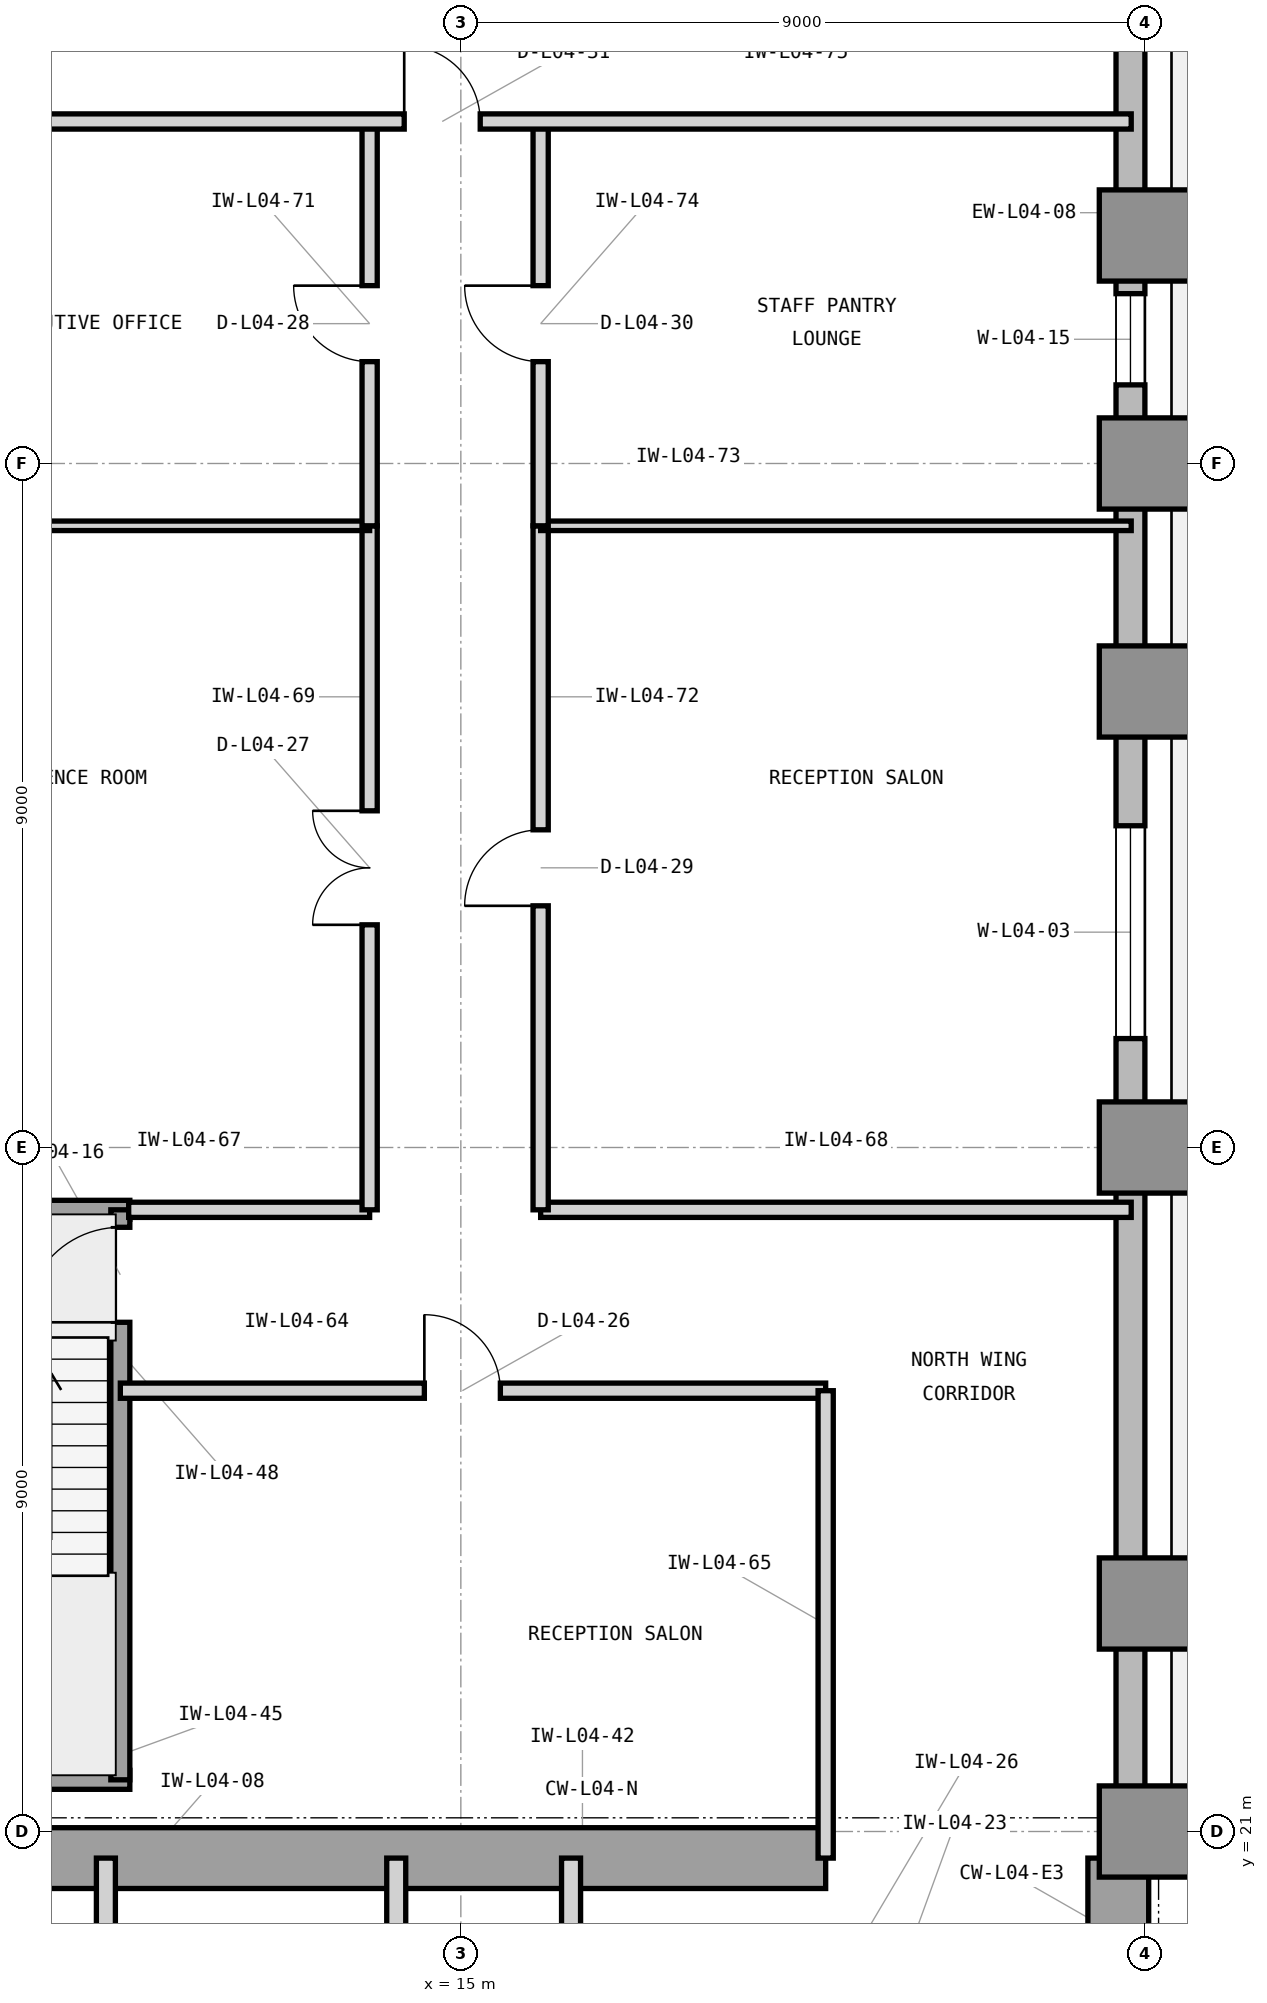
"""IFC4 building model, lengths in metres.
Left out: names, types, materials, properties, quantities, classifications, styles, units other than length and angle.
Written with IfcOpenShell. Run it as: python <this file> out.ifc"""

import sys

from ifc_helpers import new_model, si_unit, direction, frame, frame_2d, origin, origin_2d, place, context, subcontext, project, spatial, rectangle, extrude, element, fill, save


model = new_model("IFC4")
c1 = context("Model", 3, precision=1e-05, world=origin(), true_north=direction((0.0, 1.0)))
c2 = subcontext(c1, "Body", "Model", "MODEL_VIEW")
j1 = project(units=[si_unit("LENGTHUNIT", "METRE"), si_unit("PLANEANGLEUNIT", "RADIAN")], contexts=[c1])
p1 = place(None, origin())
s1 = spatial("IfcSite", under=j1, at=p1, CompositionType="ELEMENT")
p2 = place(p1, origin())
s2 = spatial("IfcBuilding", under=s1, at=p2, CompositionType="ELEMENT")
p3 = place(p2, frame((0.0, 0.0, 21.6)))
s3 = spatial("IfcBuildingStorey", under=s2, at=p3, CompositionType="ELEMENT", Elevation=21.6)
p4 = place(p3, frame((7.475, 20.65, 0.0), z_axis=(0.0, 0.0, 1.0), x_axis=(1.0, 0.0, 0.0)))
e1 = element("IfcWall", 1, at=p4, inside=s3, PredefinedType="SHEAR", context=c2, shape_type="SweptSolid", body=[
    extrude(rectangle(XDim=12.325, YDim=0.8, at=frame_2d((6.163, 0.0))), origin(), (0.0, 0.0, 1.0), 4.2),
])
p5 = place(p3, frame((23.65, 16.6, 0.0), z_axis=(0.0, 0.0, 1.0), x_axis=(0.0, 1.0, 0.0)))
e2 = element("IfcWall", 2, at=p5, inside=s3, PredefinedType="SHEAR", context=c2, shape_type="SweptSolid", body=[
    extrude(rectangle(XDim=4.05, YDim=0.8, at=frame_2d((2.025, 0.0))), origin(), (0.0, 0.0, 1.0), 4.2),
])
for number, where, z_axis, x_axis in (
    (3, (24.0, 21.0, 0.0), (0.0, 0.0, 1.0), (1.0, 0.0, 0.0)),
    (4, (24.0, 24.0, 0.0), (0.0, 0.0, 1.0), (1.0, 0.0, 0.0)),
    (5, (24.0, 30.0, 0.0), (0.0, 0.0, 1.0), (1.0, 0.0, 0.0)),
    (6, (24.0, 36.0, 0.0), (0.0, 0.0, 1.0), (1.0, 0.0, 0.0)),
    (7, (24.0, 39.0, 0.0), (0.0, 0.0, 1.0), (1.0, 0.0, 0.0)),
    (8, (24.0, 42.0, 0.0), (0.0, 0.0, 1.0), (1.0, 0.0, 0.0)),
):
    element("IfcColumn", number, at=place(p3, frame(where, z_axis=z_axis, x_axis=x_axis)), inside=s3, PredefinedType="COLUMN", context=c2, shape_type="SweptSolid", body=[
        extrude(rectangle(XDim=1.2, YDim=1.2, at=origin_2d()), origin(), (0.0, 0.0, 1.0), 4.2),
    ])
p6 = place(p3, frame((64.4, 20.81, 0.0), z_axis=(0.0, 0.0, 1.0), x_axis=(-1.0, 0.0, 0.0)))
e9 = element("IfcWall", 9, at=p6, inside=s3, PredefinedType="STANDARD", context=c2, shape_type="SweptSolid", body=[
    extrude(rectangle(XDim=40.4, YDim=0.38, at=frame_2d((20.2, 0.0))), origin(), (0.0, 0.0, 1.0), 3.98),
])
p7 = place(p6, frame((23.6, 0.0, 0.0)))
e10 = element("IfcOpeningElement", 10, at=p7, cuts=e9, PredefinedType="OPENING", context=c2, shape_type="SweptSolid", body=[
    extrude(rectangle(XDim=1.8, YDim=2.35, at=frame_2d((0.9, 1.175))), frame((0.0, 0.2, 0.0), z_axis=(0.0, -1.0, 0.0), x_axis=(1.0, 0.0, 0.0)), (0.0, 0.0, 1.0), 0.4),
])
p8 = place(p6, frame((38.234, 0.0, 0.85)))
e11 = element("IfcOpeningElement", 11, at=p8, cuts=e9, PredefinedType="OPENING", context=c2, shape_type="SweptSolid", body=[
    extrude(rectangle(XDim=1.2, YDim=2.45, at=frame_2d((0.6, 1.225))), frame((0.0, 0.2, 0.0), z_axis=(0.0, -1.0, 0.0), x_axis=(1.0, 0.0, 0.0)), (0.0, 0.0, 1.0), 0.4),
])
p9 = place(p6, frame((32.354, 0.0, 0.85)))
e12 = element("IfcOpeningElement", 12, at=p9, cuts=e9, PredefinedType="OPENING", context=c2, shape_type="SweptSolid", body=[
    extrude(rectangle(XDim=2.8, YDim=2.45, at=frame_2d((1.4, 1.225))), frame((0.0, 0.2, 0.0), z_axis=(0.0, -1.0, 0.0), x_axis=(1.0, 0.0, 0.0)), (0.0, 0.0, 1.0), 0.4),
])
p10 = place(p6, frame((18.604, 0.0, 0.85)))
e13 = element("IfcOpeningElement", 13, at=p10, cuts=e9, PredefinedType="OPENING", context=c2, shape_type="SweptSolid", body=[
    extrude(rectangle(XDim=2.8, YDim=2.45, at=frame_2d((1.4, 1.225))), frame((0.0, 0.2, 0.0), z_axis=(0.0, -1.0, 0.0), x_axis=(1.0, 0.0, 0.0)), (0.0, 0.0, 1.0), 0.4),
])
p11 = place(p6, frame((11.154, 0.0, 0.85)))
e14 = element("IfcOpeningElement", 14, at=p11, cuts=e9, PredefinedType="OPENING", context=c2, shape_type="SweptSolid", body=[
    extrude(rectangle(XDim=1.2, YDim=2.45, at=frame_2d((0.6, 1.225))), frame((0.0, 0.2, 0.0), z_axis=(0.0, -1.0, 0.0), x_axis=(1.0, 0.0, 0.0)), (0.0, 0.0, 1.0), 0.4),
])
p12 = place(p3, frame((23.81, 21.0, 0.0), z_axis=(0.0, 0.0, 1.0), x_axis=(0.0, 1.0, 0.0)))
e15 = element("IfcWall", 15, at=p12, inside=s3, PredefinedType="STANDARD", context=c2, shape_type="SweptSolid", body=[
    extrude(rectangle(XDim=28.4, YDim=0.38, at=frame_2d((14.2, 0.0))), origin(), (0.0, 0.0, 1.0), 3.98),
])
p13 = place(p12, frame((10.433, 0.0, 0.85)))
e16 = element("IfcOpeningElement", 16, at=p13, cuts=e15, PredefinedType="OPENING", context=c2, shape_type="SweptSolid", body=[
    extrude(rectangle(XDim=2.8, YDim=2.45, at=frame_2d((1.4, 1.225))), frame((0.0, 0.2, 0.0), z_axis=(0.0, -1.0, 0.0), x_axis=(1.0, 0.0, 0.0)), (0.0, 0.0, 1.0), 0.4),
])
p14 = place(p12, frame((19.034, 0.0, 0.85)))
e17 = element("IfcOpeningElement", 17, at=p14, cuts=e15, PredefinedType="OPENING", context=c2, shape_type="SweptSolid", body=[
    extrude(rectangle(XDim=1.2, YDim=2.45, at=frame_2d((0.6, 1.225))), frame((0.0, 0.2, 0.0), z_axis=(0.0, -1.0, 0.0), x_axis=(1.0, 0.0, 0.0)), (0.0, 0.0, 1.0), 0.4),
])
p15 = place(p3, frame((10.33, 19.45, 0.0), z_axis=(0.0, 0.0, 1.0), x_axis=(0.0, 1.0, 0.0)))
e18 = element("IfcWall", 18, at=p15, inside=s3, PredefinedType="PARTITIONING", context=c2, shape_type="SweptSolid", body=[
    extrude(rectangle(XDim=1.2, YDim=0.25, at=frame_2d((0.6, 0.0))), origin(), (0.0, 0.0, 1.0), 3.114),
])
for number, where, z_axis, x_axis in (
    (19, (14.15, 16.7, 0.0), (0.0, 0.0, 1.0), (0.0, 1.0, 0.0)),
    (20, (16.45, 16.7, 0.0), (0.0, 0.0, 1.0), (0.0, 1.0, 0.0)),
):
    element("IfcWall", number, at=place(p3, frame(where, z_axis=z_axis, x_axis=x_axis)), inside=s3, PredefinedType="PARTITIONING", context=c2, shape_type="SweptSolid", body=[
        extrude(rectangle(XDim=3.95, YDim=0.25, at=frame_2d((1.975, 0.0))), origin(), (0.0, 0.0, 1.0), 3.97),
    ])
for number, where, z_axis, x_axis in (
    (21, (6.555, 21.68, 0.0), (0.0, 0.0, 1.0), (1.0, 0.0, 0.0)),
    (22, (6.555, 29.18, 0.0), (0.0, 0.0, 1.0), (1.0, 0.0, 0.0)),
):
    element("IfcWall", number, at=place(p3, frame(where, z_axis=z_axis, x_axis=x_axis)), inside=s3, PredefinedType="SHEAR", context=c2, shape_type="SweptSolid", body=[
        extrude(rectangle(XDim=4.09, YDim=0.25, at=frame_2d((2.045, 0.0))), origin(), (0.0, 0.0, 1.0), 4.2),
    ])
p16 = place(p3, frame((10.52, 21.68, 0.0), z_axis=(0.0, 0.0, 1.0), x_axis=(0.0, 1.0, 0.0)))
e23 = element("IfcWall", 23, at=p16, inside=s3, PredefinedType="SHEAR", context=c2, shape_type="SweptSolid", body=[
    extrude(rectangle(XDim=7.5, YDim=0.25, at=frame_2d((3.75, 0.0))), origin(), (0.0, 0.0, 1.0), 4.2),
])
p17 = place(p16, frame((6.02, 0.0, 0.0)))
e24 = element("IfcOpeningElement", 24, at=p17, cuts=e23, PredefinedType="OPENING", context=c2, shape_type="SweptSolid", body=[
    extrude(rectangle(XDim=1.25, YDim=2.2, at=frame_2d((0.625, 1.1))), frame((0.0, 0.135, 0.0), z_axis=(0.0, -1.0, 0.0), x_axis=(1.0, 0.0, 0.0)), (0.0, 0.0, 1.0), 0.27),
])
p18 = place(p3, frame((10.52, 26.8, 0.0), z_axis=(0.0, 0.0, 1.0), x_axis=(1.0, 0.0, 0.0)))
e25 = element("IfcWall", 25, at=p18, inside=s3, PredefinedType="PARTITIONING", context=c2, shape_type="SweptSolid", body=[
    extrude(rectangle(XDim=9.28, YDim=0.2, at=frame_2d((4.64, 0.0))), origin(), (0.0, 0.0, 1.0), 3.97),
])
p19 = place(p18, frame((4.0, 0.0, 0.0)))
e26 = element("IfcOpeningElement", 26, at=p19, cuts=e25, PredefinedType="OPENING", context=c2, shape_type="SweptSolid", body=[
    extrude(rectangle(XDim=1.0, YDim=2.15, at=frame_2d((0.5, 1.075))), frame((0.0, 0.11, 0.0), z_axis=(0.0, -1.0, 0.0), x_axis=(1.0, 0.0, 0.0)), (0.0, 0.0, 1.0), 0.22),
])
p20 = place(p3, frame((19.8, 20.65, 0.0), z_axis=(0.0, 0.0, 1.0), x_axis=(0.0, 1.0, 0.0)))
e27 = element("IfcWall", 27, at=p20, inside=s3, PredefinedType="PARTITIONING", context=c2, shape_type="SweptSolid", body=[
    extrude(rectangle(XDim=6.15, YDim=0.2, at=frame_2d((3.075, 0.0))), origin(), (0.0, 0.0, 1.0), 3.97),
])
p21 = place(p3, frame((10.63, 29.18, 0.0), z_axis=(0.0, 0.0, 1.0), x_axis=(1.0, 0.0, 0.0)))
e28 = element("IfcWall", 28, at=p21, inside=s3, PredefinedType="PARTITIONING", context=c2, shape_type="SweptSolid", body=[
    extrude(rectangle(XDim=3.17, YDim=0.2, at=frame_2d((1.585, 0.0))), origin(), (0.0, 0.0, 1.0), 3.97),
])
p22 = place(p3, frame((16.05, 29.18, 0.0), z_axis=(0.0, 0.0, 1.0), x_axis=(1.0, 0.0, 0.0)))
e29 = element("IfcWall", 29, at=p22, inside=s3, PredefinedType="PARTITIONING", context=c2, shape_type="SweptSolid", body=[
    extrude(rectangle(XDim=7.77, YDim=0.2, at=frame_2d((3.885, 0.0))), origin(), (0.0, 0.0, 1.0), 3.97),
])
p23 = place(p3, frame((13.8, 29.18, 0.0), z_axis=(0.0, 0.0, 1.0), x_axis=(0.0, 1.0, 0.0)))
e30 = element("IfcWall", 30, at=p23, inside=s3, PredefinedType="PARTITIONING", context=c2, shape_type="SweptSolid", body=[
    extrude(rectangle(XDim=9.0, YDim=0.2, at=frame_2d((4.5, 0.0))), origin(), (0.0, 0.0, 1.0), 3.97),
])
p24 = place(p23, frame((3.75, 0.0, 0.0)))
e31 = element("IfcOpeningElement", 31, at=p24, cuts=e30, PredefinedType="OPENING", context=c2, shape_type="SweptSolid", body=[
    extrude(rectangle(XDim=1.5, YDim=2.3, at=frame_2d((0.75, 1.15))), frame((0.0, 0.11, 0.0), z_axis=(0.0, -1.0, 0.0), x_axis=(1.0, 0.0, 0.0)), (0.0, 0.0, 1.0), 0.22),
])
p25 = place(p3, frame((6.18, 38.18, 0.0), z_axis=(0.0, 0.0, 1.0), x_axis=(1.0, 0.0, 0.0)))
e32 = element("IfcWall", 32, at=p25, inside=s3, PredefinedType="PARTITIONING", context=c2, shape_type="SweptSolid", body=[
    extrude(rectangle(XDim=7.62, YDim=0.125, at=frame_2d((3.81, 0.0))), origin(), (0.0, 0.0, 1.0), 3.97),
])
p26 = place(p3, frame((13.8, 38.18, 0.0), z_axis=(0.0, 0.0, 1.0), x_axis=(0.0, 1.0, 0.0)))
e33 = element("IfcWall", 33, at=p26, inside=s3, PredefinedType="PARTITIONING", context=c2, shape_type="SweptSolid", body=[
    extrude(rectangle(XDim=5.32, YDim=0.2, at=frame_2d((2.66, 0.0))), origin(), (0.0, 0.0, 1.0), 3.97),
])
p27 = place(p26, frame((2.16, 0.0, 0.0)))
e34 = element("IfcOpeningElement", 34, at=p27, cuts=e33, PredefinedType="OPENING", context=c2, shape_type="SweptSolid", body=[
    extrude(rectangle(XDim=1.0, YDim=2.15, at=frame_2d((0.5, 1.075))), frame((0.0, 0.11, 0.0), z_axis=(0.0, -1.0, 0.0), x_axis=(1.0, 0.0, 0.0)), (0.0, 0.0, 1.0), 0.22),
])
p28 = place(p3, frame((16.05, 29.18, 0.0), z_axis=(0.0, 0.0, 1.0), x_axis=(0.0, 1.0, 0.0)))
e35 = element("IfcWall", 35, at=p28, inside=s3, PredefinedType="PARTITIONING", context=c2, shape_type="SweptSolid", body=[
    extrude(rectangle(XDim=9.0, YDim=0.2, at=frame_2d((4.5, 0.0))), origin(), (0.0, 0.0, 1.0), 3.97),
])
p29 = place(p28, frame((4.0, 0.0, 0.0)))
e36 = element("IfcOpeningElement", 36, at=p29, cuts=e35, PredefinedType="OPENING", context=c2, shape_type="SweptSolid", body=[
    extrude(rectangle(XDim=1.0, YDim=2.15, at=frame_2d((0.5, 1.075))), frame((0.0, 0.11, 0.0), z_axis=(0.0, -1.0, 0.0), x_axis=(1.0, 0.0, 0.0)), (0.0, 0.0, 1.0), 0.22),
])
p30 = place(p3, frame((16.05, 38.18, 0.0), z_axis=(0.0, 0.0, 1.0), x_axis=(1.0, 0.0, 0.0)))
e37 = element("IfcWall", 37, at=p30, inside=s3, PredefinedType="PARTITIONING", context=c2, shape_type="SweptSolid", body=[
    extrude(rectangle(XDim=7.77, YDim=0.125, at=frame_2d((3.885, 0.0))), origin(), (0.0, 0.0, 1.0), 3.97),
])
p31 = place(p3, frame((16.05, 38.18, 0.0), z_axis=(0.0, 0.0, 1.0), x_axis=(0.0, 1.0, 0.0)))
e38 = element("IfcWall", 38, at=p31, inside=s3, PredefinedType="PARTITIONING", context=c2, shape_type="SweptSolid", body=[
    extrude(rectangle(XDim=5.32, YDim=0.2, at=frame_2d((2.66, 0.0))), origin(), (0.0, 0.0, 1.0), 3.97),
])
p32 = place(p31, frame((2.16, 0.0, 0.0)))
e39 = element("IfcOpeningElement", 39, at=p32, cuts=e38, PredefinedType="OPENING", context=c2, shape_type="SweptSolid", body=[
    extrude(rectangle(XDim=1.0, YDim=2.15, at=frame_2d((0.5, 1.075))), frame((0.0, 0.11, 0.0), z_axis=(0.0, -1.0, 0.0), x_axis=(1.0, 0.0, 0.0)), (0.0, 0.0, 1.0), 0.22),
])
p33 = place(p3, frame((6.18, 43.5, 0.0), z_axis=(0.0, 0.0, 1.0), x_axis=(1.0, 0.0, 0.0)))
e40 = element("IfcWall", 40, at=p33, inside=s3, PredefinedType="PARTITIONING", context=c2, shape_type="SweptSolid", body=[
    extrude(rectangle(XDim=17.64, YDim=0.2, at=frame_2d((8.82, 0.0))), origin(), (0.0, 0.0, 1.0), 3.97),
])
p34 = place(p33, frame((8.075, 0.0, 0.0)))
e41 = element("IfcOpeningElement", 41, at=p34, cuts=e40, PredefinedType="OPENING", context=c2, shape_type="SweptSolid", body=[
    extrude(rectangle(XDim=1.0, YDim=2.15, at=frame_2d((0.5, 1.075))), frame((0.0, 0.11, 0.0), z_axis=(0.0, -1.0, 0.0), x_axis=(1.0, 0.0, 0.0)), (0.0, 0.0, 1.0), 0.22),
])
p35 = place(p13, origin())
e42 = element("IfcWindow", 42, at=p35, inside=s3, PartitioningType="SINGLE_PANEL", PredefinedType="WINDOW", context=c2, shape_type="SweptSolid", body=[
    extrude(rectangle(XDim=2.8, YDim=2.45, at=frame_2d((1.4, 1.225))), frame((0.0, 0.11, 0.0), z_axis=(0.0, -1.0, 0.0), x_axis=(1.0, 0.0, 0.0)), (0.0, 0.0, 1.0), 0.06),
])
fill(e16, e42)
p36 = place(p17, origin())
e43 = element("IfcDoor", 43, at=p36, inside=s3, OperationType="SINGLE_SWING_LEFT", PredefinedType="DOOR", context=c2, shape_type="SweptSolid", body=[
    extrude(rectangle(XDim=1.25, YDim=2.2, at=frame_2d((0.625, 1.1))), frame((0.0, 0.025, 0.0), z_axis=(0.0, -1.0, 0.0), x_axis=(1.0, 0.0, 0.0)), (0.0, 0.0, 1.0), 0.05),
])
fill(e24, e43)
p37 = place(p19, origin())
e44 = element("IfcDoor", 44, at=p37, inside=s3, OperationType="SINGLE_SWING_LEFT", PredefinedType="DOOR", context=c2, shape_type="SweptSolid", body=[
    extrude(rectangle(XDim=1.0, YDim=2.15, at=frame_2d((0.5, 1.075))), frame((0.0, 0.025, 0.0), z_axis=(0.0, -1.0, 0.0), x_axis=(1.0, 0.0, 0.0)), (0.0, 0.0, 1.0), 0.05),
])
fill(e26, e44)
p38 = place(p24, origin())
e45 = element("IfcDoor", 45, at=p38, inside=s3, OperationType="DOUBLE_DOOR_SINGLE_SWING", PredefinedType="DOOR", context=c2, shape_type="SweptSolid", body=[
    extrude(rectangle(XDim=1.5, YDim=2.3, at=frame_2d((0.75, 1.15))), frame((0.0, 0.025, 0.0), z_axis=(0.0, -1.0, 0.0), x_axis=(1.0, 0.0, 0.0)), (0.0, 0.0, 1.0), 0.05),
])
fill(e31, e45)
p39 = place(p27, origin())
e46 = element("IfcDoor", 46, at=p39, inside=s3, OperationType="SINGLE_SWING_RIGHT", PredefinedType="DOOR", context=c2, shape_type="SweptSolid", body=[
    extrude(rectangle(XDim=1.0, YDim=2.15, at=frame_2d((0.5, 1.075))), frame((0.0, 0.025, 0.0), z_axis=(0.0, -1.0, 0.0), x_axis=(1.0, 0.0, 0.0)), (0.0, 0.0, 1.0), 0.05),
])
fill(e34, e46)
p40 = place(p29, origin())
e47 = element("IfcDoor", 47, at=p40, inside=s3, OperationType="SINGLE_SWING_LEFT", PredefinedType="DOOR", context=c2, shape_type="SweptSolid", body=[
    extrude(rectangle(XDim=1.0, YDim=2.15, at=frame_2d((0.5, 1.075))), frame((0.0, 0.025, 0.0), z_axis=(0.0, -1.0, 0.0), x_axis=(1.0, 0.0, 0.0)), (0.0, 0.0, 1.0), 0.05),
])
fill(e36, e47)
p41 = place(p32, origin())
e48 = element("IfcDoor", 48, at=p41, inside=s3, OperationType="SINGLE_SWING_RIGHT", PredefinedType="DOOR", context=c2, shape_type="SweptSolid", body=[
    extrude(rectangle(XDim=1.0, YDim=2.15, at=frame_2d((0.5, 1.075))), frame((0.0, 0.025, 0.0), z_axis=(0.0, -1.0, 0.0), x_axis=(1.0, 0.0, 0.0)), (0.0, 0.0, 1.0), 0.05),
])
fill(e39, e48)
p42 = place(p34, origin())
e49 = element("IfcDoor", 49, at=p42, inside=s3, OperationType="SINGLE_SWING_LEFT", PredefinedType="DOOR", context=c2, shape_type="SweptSolid", body=[
    extrude(rectangle(XDim=1.0, YDim=2.15, at=frame_2d((0.5, 1.075))), frame((0.0, 0.025, 0.0), z_axis=(0.0, -1.0, 0.0), x_axis=(1.0, 0.0, 0.0)), (0.0, 0.0, 1.0), 0.05),
])
fill(e41, e49)
p43 = place(p14, origin())
e50 = element("IfcWindow", 50, at=p43, inside=s3, PartitioningType="SINGLE_PANEL", PredefinedType="WINDOW", context=c2, shape_type="SweptSolid", body=[
    extrude(rectangle(XDim=1.2, YDim=2.45, at=frame_2d((0.6, 1.225))), frame((0.0, 0.11, 0.0), z_axis=(0.0, -1.0, 0.0), x_axis=(1.0, 0.0, 0.0)), (0.0, 0.0, 1.0), 0.06),
])
fill(e17, e50)
save(model, sys.argv[1])
